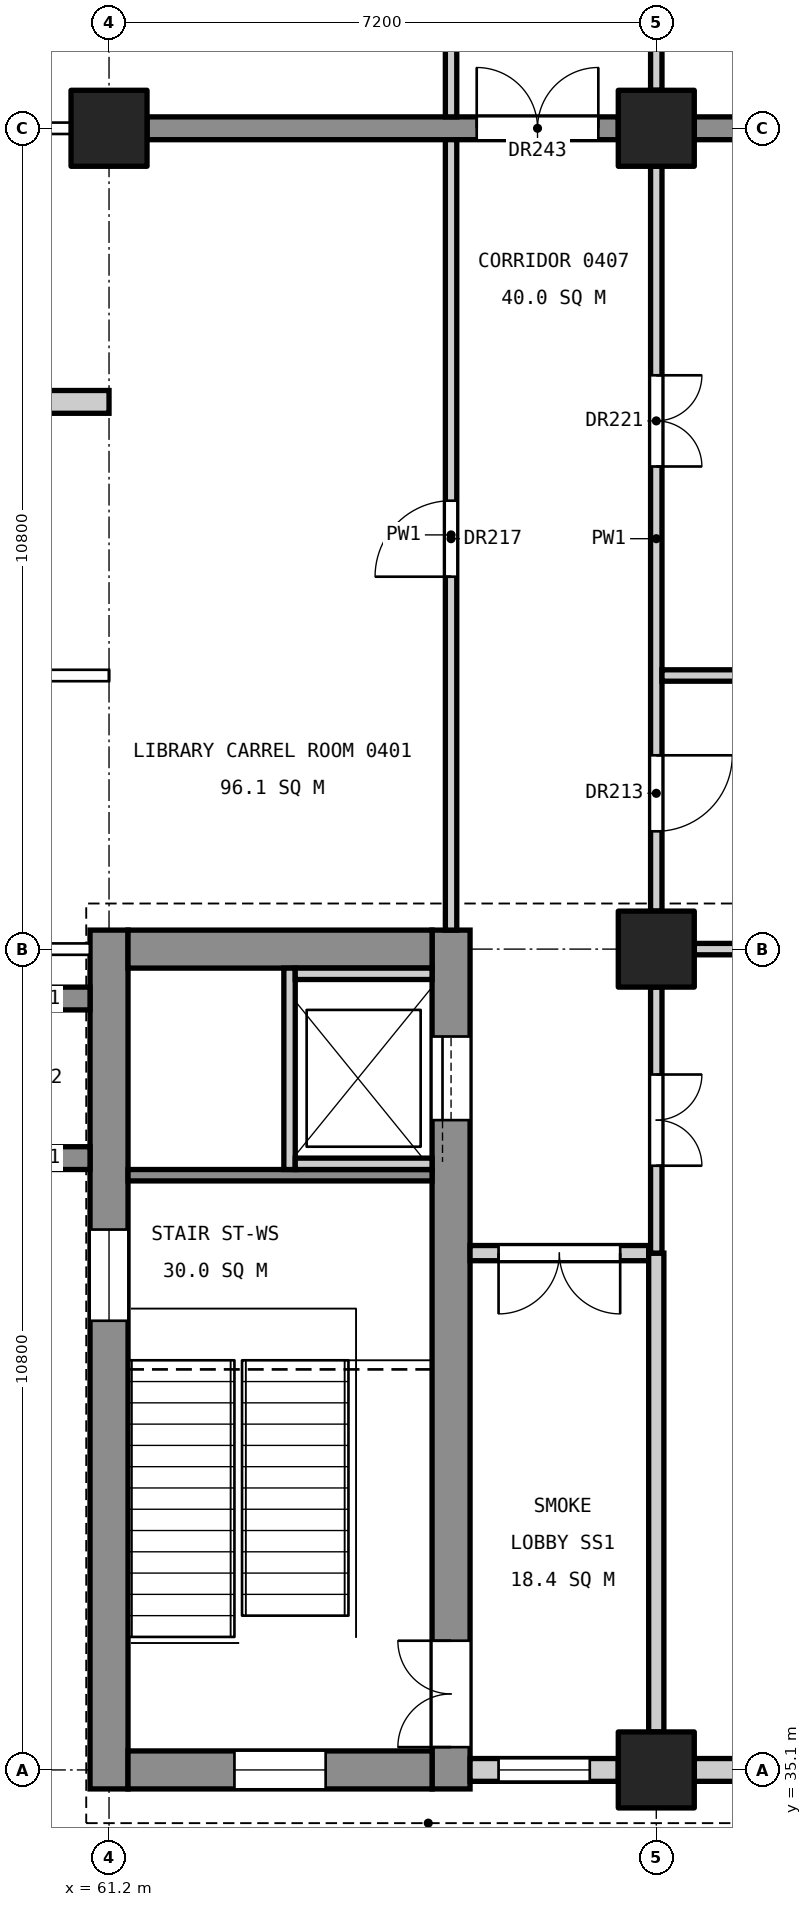
"""IFC4 building model, lengths in metres.
Left out: names, types, materials, properties, quantities, classifications, styles, units other than length and angle.
Written with IfcOpenShell. Run it as: python <this file> out.ifc"""

import sys

from ifc_helpers import new_model, si_unit, direction, frame, frame_2d, origin, origin_2d, place, context, subcontext, project, spatial, rectangle, extrude, element, fill, save


model = new_model("IFC4")
c1 = context("Model", 3, precision=1e-05, world=origin(), true_north=direction((0.0, 1.0)))
c2 = subcontext(c1, "Body", "Model", "MODEL_VIEW")
j1 = project(units=[si_unit("LENGTHUNIT", "METRE"), si_unit("PLANEANGLEUNIT", "RADIAN")], contexts=[c1])
p1 = place(None, origin())
s1 = spatial("IfcSite", under=j1, at=p1, CompositionType="ELEMENT")
p2 = place(p1, origin())
s2 = spatial("IfcBuilding", under=s1, at=p2, CompositionType="ELEMENT")
p3 = place(p2, frame((0.0, 0.0, 22.2)))
s3 = spatial("IfcBuildingStorey", under=s2, at=p3, CompositionType="ELEMENT", Elevation=22.2)
for number, where, z_axis, x_axis in (
    (1, (61.2, 56.7, 0.0), (0.0, 0.0, 1.0), (1.0, 0.0, 0.0)),
    (2, (68.4, 35.1, 0.0), (0.0, 0.0, 1.0), (1.0, 0.0, 0.0)),
    (3, (68.4, 45.9, 0.0), (0.0, 0.0, 1.0), (1.0, 0.0, 0.0)),
    (4, (68.4, 56.7, 0.0), (0.0, 0.0, 1.0), (1.0, 0.0, 0.0)),
):
    element("IfcColumn", number, at=place(p3, frame(where, z_axis=z_axis, x_axis=x_axis)), inside=s3, PredefinedType="COLUMN", context=c2, shape_type="SweptSolid", body=[
        extrude(rectangle(XDim=1.0, YDim=1.0, at=origin_2d()), origin(), (0.0, 0.0, 1.0), 4.8),
    ])
p4 = place(p3, frame((61.2, 34.85, 0.0), z_axis=(0.0, 0.0, 1.0), x_axis=(0.0, 1.0, 0.0)))
e5 = element("IfcWall", 5, at=p4, inside=s3, PredefinedType="SHEAR", context=c2, shape_type="SweptSolid", body=[
    extrude(rectangle(XDim=11.3, YDim=0.5, at=frame_2d((5.65, 0.0))), origin(), (0.0, 0.0, 1.0), 4.55),
])
p5 = place(p4, frame((6.16, 0.0, 3.4)))
e6 = element("IfcOpeningElement", 6, at=p5, cuts=e5, PredefinedType="OPENING", context=c2, shape_type="SweptSolid", body=[
    extrude(rectangle(XDim=1.2, YDim=0.9, at=frame_2d((0.6, 0.45))), frame((0.0, 0.26, 0.0), z_axis=(0.0, -1.0, 0.0), x_axis=(1.0, 0.0, 0.0)), (0.0, 0.0, 1.0), 0.52),
])
p6 = place(p3, frame((65.7, 34.85, 0.0), z_axis=(0.0, 0.0, 1.0), x_axis=(0.0, 1.0, 0.0)))
e7 = element("IfcWall", 7, at=p6, inside=s3, PredefinedType="SHEAR", context=c2, shape_type="SweptSolid", body=[
    extrude(rectangle(XDim=11.3, YDim=0.5, at=frame_2d((5.65, 0.0))), origin(), (0.0, 0.0, 1.0), 4.55),
])
p7 = place(p6, frame((0.55, 0.0, 0.0)))
e8 = element("IfcOpeningElement", 8, at=p7, cuts=e7, PredefinedType="OPENING", context=c2, shape_type="SweptSolid", body=[
    extrude(rectangle(XDim=1.4, YDim=2.1, at=frame_2d((0.7, 1.05))), frame((0.0, 0.26, 0.0), z_axis=(0.0, -1.0, 0.0), x_axis=(1.0, 0.0, 0.0)), (0.0, 0.0, 1.0), 0.52),
])
p8 = place(p6, frame((8.8, 0.0, 0.0)))
e9 = element("IfcOpeningElement", 9, at=p8, cuts=e7, PredefinedType="OPENING", context=c2, shape_type="SweptSolid", body=[
    extrude(rectangle(XDim=1.1, YDim=2.1, at=frame_2d((0.55, 1.05))), frame((0.0, 0.26, 0.0), z_axis=(0.0, -1.0, 0.0), x_axis=(1.0, 0.0, 0.0)), (0.0, 0.0, 1.0), 0.52),
])
p9 = place(p3, frame((61.45, 35.1, 0.0), z_axis=(0.0, 0.0, 1.0), x_axis=(1.0, 0.0, 0.0)))
e10 = element("IfcWall", 10, at=p9, inside=s3, PredefinedType="SHEAR", context=c2, shape_type="SweptSolid", body=[
    extrude(rectangle(XDim=4.0, YDim=0.5, at=frame_2d((2.0, 0.0))), origin(), (0.0, 0.0, 1.0), 4.55),
])
p10 = place(p9, frame((1.4, 0.0, 3.4)))
e11 = element("IfcOpeningElement", 11, at=p10, cuts=e10, PredefinedType="OPENING", context=c2, shape_type="SweptSolid", body=[
    extrude(rectangle(XDim=1.2, YDim=0.9, at=frame_2d((0.6, 0.45))), frame((0.0, 0.26, 0.0), z_axis=(0.0, -1.0, 0.0), x_axis=(1.0, 0.0, 0.0)), (0.0, 0.0, 1.0), 0.52),
])
p11 = place(p3, frame((61.45, 45.9, 0.0), z_axis=(0.0, 0.0, 1.0), x_axis=(1.0, 0.0, 0.0)))
e12 = element("IfcWall", 12, at=p11, inside=s3, PredefinedType="SHEAR", context=c2, shape_type="SweptSolid", body=[
    extrude(rectangle(XDim=4.0, YDim=0.5, at=frame_2d((2.0, 0.0))), origin(), (0.0, 0.0, 1.0), 4.55),
])
for number, where, z_axis, x_axis in (
    (13, (60.95, 43.15, 0.0), (0.0, 0.0, 1.0), (-1.0, 0.0, 0.0)),
    (14, (60.95, 45.25, 0.0), (0.0, 0.0, 1.0), (-1.0, 0.0, 0.0)),
):
    element("IfcWall", number, at=place(p3, frame(where, z_axis=z_axis, x_axis=x_axis)), inside=s3, PredefinedType="SHEAR", context=c2, shape_type="SweptSolid", body=[
        extrude(rectangle(XDim=1.25, YDim=0.3, at=frame_2d((0.625, 0.0))), origin(), (0.0, 0.0, 1.0), 4.8),
    ])
p12 = place(p3, frame((61.7, 56.7, 0.0), z_axis=(0.0, 0.0, 1.0), x_axis=(1.0, 0.0, 0.0)))
e15 = element("IfcWall", 15, at=p12, inside=s3, PredefinedType="SHEAR", context=c2, shape_type="SweptSolid", body=[
    extrude(rectangle(XDim=6.2, YDim=0.3, at=frame_2d((3.1, 0.0))), origin(), (0.0, 0.0, 1.0), 4.55),
])
p13 = place(p12, frame((4.337, 0.0, 0.0)))
e16 = element("IfcOpeningElement", 16, at=p13, cuts=e15, PredefinedType="OPENING", context=c2, shape_type="SweptSolid", body=[
    extrude(rectangle(XDim=1.6, YDim=2.1, at=frame_2d((0.8, 1.05))), frame((0.0, 0.16, 0.0), z_axis=(0.0, -1.0, 0.0), x_axis=(1.0, 0.0, 0.0)), (0.0, 0.0, 1.0), 0.32),
])
p14 = place(p3, frame((68.9, 56.7, 0.0), z_axis=(0.0, 0.0, 1.0), x_axis=(1.0, 0.0, 0.0)))
e17 = element("IfcWall", 17, at=p14, inside=s3, PredefinedType="SHEAR", context=c2, shape_type="SweptSolid", body=[
    extrude(rectangle(XDim=9.8, YDim=0.3, at=frame_2d((4.9, 0.0))), origin(), (0.0, 0.0, 1.0), 4.55),
])
p15 = place(p3, frame((61.45, 42.925, 0.0), z_axis=(0.0, 0.0, 1.0), x_axis=(1.0, 0.0, 0.0)))
e18 = element("IfcWall", 18, at=p15, inside=s3, PredefinedType="SOLIDWALL", context=c2, shape_type="SweptSolid", body=[
    extrude(rectangle(XDim=4.0, YDim=0.15, at=frame_2d((2.0, 0.0))), origin(), (0.0, 0.0, 1.0), 4.55),
])
p16 = place(p3, frame((63.575, 43.0, 0.0), z_axis=(0.0, 0.0, 1.0), x_axis=(0.0, 1.0, 0.0)))
e19 = element("IfcWall", 19, at=p16, inside=s3, PredefinedType="SOLIDWALL", context=c2, shape_type="SweptSolid", body=[
    extrude(rectangle(XDim=2.65, YDim=0.15, at=frame_2d((1.325, 0.0))), origin(), (0.0, 0.0, 1.0), 4.8),
])
for number, where, z_axis, x_axis in (
    (20, (63.65, 43.075, 0.0), (0.0, 0.0, 1.0), (1.0, 0.0, 0.0)),
    (21, (63.65, 45.575, 0.0), (0.0, 0.0, 1.0), (1.0, 0.0, 0.0)),
):
    element("IfcWall", number, at=place(p3, frame(where, z_axis=z_axis, x_axis=x_axis)), inside=s3, PredefinedType="SOLIDWALL", context=c2, shape_type="SweptSolid", body=[
        extrude(rectangle(XDim=1.8, YDim=0.15, at=frame_2d((0.9, 0.0))), origin(), (0.0, 0.0, 1.0), 4.8),
    ])
p17 = place(p3, frame((65.95, 35.1, 0.0), z_axis=(0.0, 0.0, 1.0), x_axis=(1.0, 0.0, 0.0)))
e22 = element("IfcWall", 22, at=p17, inside=s3, PredefinedType="STANDARD", context=c2, shape_type="SweptSolid", body=[
    extrude(rectangle(XDim=1.95, YDim=0.3, at=frame_2d((0.975, 0.0))), origin(), (0.0, 0.0, 1.0), 3.85),
])
p18 = place(p17, frame((0.375, 0.0, 0.9)))
e23 = element("IfcOpeningElement", 23, at=p18, cuts=e22, PredefinedType="OPENING", context=c2, shape_type="SweptSolid", body=[
    extrude(rectangle(XDim=1.2, YDim=2.4, at=frame_2d((0.6, 1.2))), frame((0.0, 0.16, 0.0), z_axis=(0.0, -1.0, 0.0), x_axis=(1.0, 0.0, 0.0)), (0.0, 0.0, 1.0), 0.32),
])
p19 = place(p3, frame((68.9, 35.1, 0.0), z_axis=(0.0, 0.0, 1.0), x_axis=(1.0, 0.0, 0.0)))
e24 = element("IfcWall", 24, at=p19, inside=s3, PredefinedType="STANDARD", context=c2, shape_type="SweptSolid", body=[
    extrude(rectangle(XDim=9.8, YDim=0.3, at=frame_2d((4.9, 0.0))), origin(), (0.0, 0.0, 1.0), 3.85),
])
p20 = place(p19, frame((0.65, 0.0, 0.9)))
e25 = element("IfcOpeningElement", 25, at=p20, cuts=e24, PredefinedType="OPENING", context=c2, shape_type="SweptSolid", body=[
    extrude(rectangle(XDim=1.8, YDim=2.4, at=frame_2d((0.9, 1.2))), frame((0.0, 0.16, 0.0), z_axis=(0.0, -1.0, 0.0), x_axis=(1.0, 0.0, 0.0)), (0.0, 0.0, 1.0), 0.32),
])
p21 = place(p19, frame((4.525, 0.0, 0.8)))
e26 = element("IfcOpeningElement", 26, at=p21, cuts=e24, PredefinedType="OPENING", context=c2, shape_type="SweptSolid", body=[
    extrude(rectangle(XDim=0.75, YDim=1.2, at=frame_2d((0.375, 0.6))), frame((0.0, 0.16, 0.0), z_axis=(0.0, -1.0, 0.0), x_axis=(1.0, 0.0, 0.0)), (0.0, 0.0, 1.0), 0.32),
])
p22 = place(p19, frame((7.35, 0.0, 0.9)))
e27 = element("IfcOpeningElement", 27, at=p22, cuts=e24, PredefinedType="OPENING", context=c2, shape_type="SweptSolid", body=[
    extrude(rectangle(XDim=1.8, YDim=2.4, at=frame_2d((0.9, 1.2))), frame((0.0, 0.16, 0.0), z_axis=(0.0, -1.0, 0.0), x_axis=(1.0, 0.0, 0.0)), (0.0, 0.0, 1.0), 0.32),
])
p23 = place(p3, frame((56.4, 53.1, 0.0), z_axis=(0.0, 0.0, 1.0), x_axis=(1.0, 0.0, 0.0)))
e28 = element("IfcWall", 28, at=p23, inside=s3, PredefinedType="STANDARD", context=c2, shape_type="SweptSolid", body=[
    extrude(rectangle(XDim=4.8, YDim=0.3, at=frame_2d((2.4, 0.0))), origin(), (0.0, 0.0, 1.0), 3.65),
])
p24 = place(p3, frame((65.7, 46.15, 0.0), z_axis=(0.0, 0.0, 1.0), x_axis=(0.0, 1.0, 0.0)))
e29 = element("IfcWall", 29, at=p24, inside=s3, PredefinedType="PARTITIONING", context=c2, shape_type="SweptSolid", body=[
    extrude(rectangle(XDim=10.4, YDim=0.15, at=frame_2d((5.2, 0.0))), origin(), (0.0, 0.0, 1.0), 3.55),
])
p25 = place(p24, frame((4.65, 0.0, 0.0)))
e30 = element("IfcOpeningElement", 30, at=p25, cuts=e29, PredefinedType="OPENING", context=c2, shape_type="SweptSolid", body=[
    extrude(rectangle(XDim=1.0, YDim=2.1, at=frame_2d((0.5, 1.05))), frame((0.0, 0.085, 0.0), z_axis=(0.0, -1.0, 0.0), x_axis=(1.0, 0.0, 0.0)), (0.0, 0.0, 1.0), 0.17),
])
p26 = place(p3, frame((65.7, 56.85, 0.0), z_axis=(0.0, 0.0, 1.0), x_axis=(0.0, 1.0, 0.0)))
e31 = element("IfcWall", 31, at=p26, inside=s3, PredefinedType="PARTITIONING", context=c2, shape_type="SweptSolid", body=[
    extrude(rectangle(XDim=3.2, YDim=0.15, at=frame_2d((1.6, 0.0))), origin(), (0.0, 0.0, 1.0), 3.55),
])
p27 = place(p26, frame((1.15, 0.0, 0.0)))
e32 = element("IfcOpeningElement", 32, at=p27, cuts=e31, PredefinedType="OPENING", context=c2, shape_type="SweptSolid", body=[
    extrude(rectangle(XDim=1.0, YDim=2.1, at=frame_2d((0.5, 1.05))), frame((0.0, 0.085, 0.0), z_axis=(0.0, -1.0, 0.0), x_axis=(1.0, 0.0, 0.0)), (0.0, 0.0, 1.0), 0.17),
])
p28 = place(p3, frame((65.95, 41.9, 0.0), z_axis=(0.0, 0.0, 1.0), x_axis=(1.0, 0.0, 0.0)))
e33 = element("IfcWall", 33, at=p28, inside=s3, PredefinedType="PARTITIONING", context=c2, shape_type="SweptSolid", body=[
    extrude(rectangle(XDim=2.35, YDim=0.2, at=frame_2d((1.175, 0.0))), origin(), (0.0, 0.0, 1.0), 3.55),
])
p29 = place(p28, frame((0.375, 0.0, 0.0)))
e34 = element("IfcOpeningElement", 34, at=p29, cuts=e33, PredefinedType="OPENING", context=c2, shape_type="SweptSolid", body=[
    extrude(rectangle(XDim=1.6, YDim=2.1, at=frame_2d((0.8, 1.05))), frame((0.0, 0.11, 0.0), z_axis=(0.0, -1.0, 0.0), x_axis=(1.0, 0.0, 0.0)), (0.0, 0.0, 1.0), 0.22),
])
p30 = place(p3, frame((68.4, 35.6, 0.0), z_axis=(0.0, 0.0, 1.0), x_axis=(0.0, 1.0, 0.0)))
e35 = element("IfcWall", 35, at=p30, inside=s3, PredefinedType="PARTITIONING", context=c2, shape_type="SweptSolid", body=[
    extrude(rectangle(XDim=6.3, YDim=0.2, at=frame_2d((3.15, 0.0))), origin(), (0.0, 0.0, 1.0), 3.55),
])
p31 = place(p3, frame((68.4, 41.9, 0.0), z_axis=(0.0, 0.0, 1.0), x_axis=(0.0, 1.0, 0.0)))
e36 = element("IfcWall", 36, at=p31, inside=s3, PredefinedType="PARTITIONING", context=c2, shape_type="SweptSolid", body=[
    extrude(rectangle(XDim=3.5, YDim=0.15, at=frame_2d((1.75, 0.0))), origin(), (0.0, 0.0, 1.0), 3.55),
])
p32 = place(p31, frame((1.15, 0.0, 0.0)))
e37 = element("IfcOpeningElement", 37, at=p32, cuts=e36, PredefinedType="OPENING", context=c2, shape_type="SweptSolid", body=[
    extrude(rectangle(XDim=1.2, YDim=2.1, at=frame_2d((0.6, 1.05))), frame((0.0, 0.085, 0.0), z_axis=(0.0, -1.0, 0.0), x_axis=(1.0, 0.0, 0.0)), (0.0, 0.0, 1.0), 0.17),
])
p33 = place(p3, frame((68.4, 46.4, 0.0), z_axis=(0.0, 0.0, 1.0), x_axis=(0.0, 1.0, 0.0)))
e38 = element("IfcWall", 38, at=p33, inside=s3, PredefinedType="PARTITIONING", context=c2, shape_type="SweptSolid", body=[
    extrude(rectangle(XDim=9.8, YDim=0.15, at=frame_2d((4.9, 0.0))), origin(), (0.0, 0.0, 1.0), 3.55),
])
p34 = place(p33, frame((1.05, 0.0, 0.0)))
e39 = element("IfcOpeningElement", 39, at=p34, cuts=e38, PredefinedType="OPENING", context=c2, shape_type="SweptSolid", body=[
    extrude(rectangle(XDim=1.0, YDim=2.1, at=frame_2d((0.5, 1.05))), frame((0.0, 0.085, 0.0), z_axis=(0.0, -1.0, 0.0), x_axis=(1.0, 0.0, 0.0)), (0.0, 0.0, 1.0), 0.17),
])
p35 = place(p33, frame((5.85, 0.0, 0.0)))
e40 = element("IfcOpeningElement", 40, at=p35, cuts=e38, PredefinedType="OPENING", context=c2, shape_type="SweptSolid", body=[
    extrude(rectangle(XDim=1.2, YDim=2.1, at=frame_2d((0.6, 1.05))), frame((0.0, 0.085, 0.0), z_axis=(0.0, -1.0, 0.0), x_axis=(1.0, 0.0, 0.0)), (0.0, 0.0, 1.0), 0.17),
])
p36 = place(p3, frame((68.4, 57.2, 0.0), z_axis=(0.0, 0.0, 1.0), x_axis=(0.0, 1.0, 0.0)))
e41 = element("IfcWall", 41, at=p36, inside=s3, PredefinedType="PARTITIONING", context=c2, shape_type="SweptSolid", body=[
    extrude(rectangle(XDim=3.1, YDim=0.15, at=frame_2d((1.55, 0.0))), origin(), (0.0, 0.0, 1.0), 3.55),
])
p37 = place(p3, frame((68.9, 45.9, 0.0), z_axis=(0.0, 0.0, 1.0), x_axis=(1.0, 0.0, 0.0)))
e42 = element("IfcWall", 42, at=p37, inside=s3, PredefinedType="PARTITIONING", context=c2, shape_type="SweptSolid", body=[
    extrude(rectangle(XDim=9.8, YDim=0.15, at=frame_2d((4.9, 0.0))), origin(), (0.0, 0.0, 1.0), 3.85),
])
p38 = place(p3, frame((68.475, 49.5, 0.0), z_axis=(0.0, 0.0, 1.0), x_axis=(1.0, 0.0, 0.0)))
e43 = element("IfcWall", 43, at=p38, inside=s3, PredefinedType="PARTITIONING", context=c2, shape_type="SweptSolid", body=[
    extrude(rectangle(XDim=10.575, YDim=0.15, at=frame_2d((5.288, 0.0))), origin(), (0.0, 0.0, 1.0), 3.85),
])
p39 = place(p7, origin())
e44 = element("IfcDoor", 44, at=p39, inside=s3, OperationType="DOUBLE_DOOR_SINGLE_SWING", PredefinedType="DOOR", context=c2, shape_type="SweptSolid", body=[
    extrude(rectangle(XDim=1.4, YDim=2.1, at=frame_2d((0.7, 1.05))), frame((0.0, 0.025, 0.0), z_axis=(0.0, -1.0, 0.0), x_axis=(1.0, 0.0, 0.0)), (0.0, 0.0, 1.0), 0.05),
])
fill(e8, e44)
p40 = place(p8, origin())
e45 = element("IfcDoor", 45, at=p40, inside=s3, OperationType="SLIDING_TO_LEFT", PredefinedType="DOOR", context=c2, shape_type="SweptSolid", body=[
    extrude(rectangle(XDim=1.1, YDim=2.1, at=frame_2d((0.55, 1.05))), frame((0.0, 0.025, 0.0), z_axis=(0.0, -1.0, 0.0), x_axis=(1.0, 0.0, 0.0)), (0.0, 0.0, 1.0), 0.05),
])
fill(e9, e45)
p41 = place(p18, origin())
e46 = element("IfcWindow", 46, at=p41, inside=s3, PartitioningType="SINGLE_PANEL", PredefinedType="WINDOW", context=c2, shape_type="SweptSolid", body=[
    extrude(rectangle(XDim=1.2, YDim=2.4, at=frame_2d((0.6, 1.2))), frame((0.0, 0.03, 0.0), z_axis=(0.0, -1.0, 0.0), x_axis=(1.0, 0.0, 0.0)), (0.0, 0.0, 1.0), 0.06),
])
fill(e23, e46)
p42 = place(p5, origin())
e47 = element("IfcWindow", 47, at=p42, inside=s3, PartitioningType="SINGLE_PANEL", PredefinedType="WINDOW", context=c2, shape_type="SweptSolid", body=[
    extrude(rectangle(XDim=1.2, YDim=0.9, at=frame_2d((0.6, 0.45))), frame((0.0, 0.03, 0.0), z_axis=(0.0, -1.0, 0.0), x_axis=(1.0, 0.0, 0.0)), (0.0, 0.0, 1.0), 0.06),
])
fill(e6, e47)
p43 = place(p10, origin())
e48 = element("IfcWindow", 48, at=p43, inside=s3, PartitioningType="SINGLE_PANEL", PredefinedType="WINDOW", context=c2, shape_type="SweptSolid", body=[
    extrude(rectangle(XDim=1.2, YDim=0.9, at=frame_2d((0.6, 0.45))), frame((0.0, 0.03, 0.0), z_axis=(0.0, -1.0, 0.0), x_axis=(1.0, 0.0, 0.0)), (0.0, 0.0, 1.0), 0.06),
])
fill(e11, e48)
p44 = place(p34, frame((1.0, 0.0, 0.0), z_axis=(0.0, 0.0, 1.0), x_axis=(-1.0, 0.0, 0.0)))
e49 = element("IfcDoor", 49, at=p44, inside=s3, OperationType="SINGLE_SWING_LEFT", PredefinedType="DOOR", context=c2, shape_type="SweptSolid", body=[
    extrude(rectangle(XDim=1.0, YDim=2.1, at=frame_2d((0.5, 1.05))), frame((0.0, 0.025, 0.0), z_axis=(0.0, -1.0, 0.0), x_axis=(1.0, 0.0, 0.0)), (0.0, 0.0, 1.0), 0.05),
])
fill(e39, e49)
p45 = place(p25, origin())
e50 = element("IfcDoor", 50, at=p45, inside=s3, OperationType="SINGLE_SWING_LEFT", PredefinedType="DOOR", context=c2, shape_type="SweptSolid", body=[
    extrude(rectangle(XDim=1.0, YDim=2.1, at=frame_2d((0.5, 1.05))), frame((0.0, 0.025, 0.0), z_axis=(0.0, -1.0, 0.0), x_axis=(1.0, 0.0, 0.0)), (0.0, 0.0, 1.0), 0.05),
])
fill(e30, e50)
p46 = place(p32, frame((1.2, 0.0, 0.0), z_axis=(0.0, 0.0, 1.0), x_axis=(-1.0, 0.0, 0.0)))
e51 = element("IfcDoor", 51, at=p46, inside=s3, OperationType="DOUBLE_DOOR_SINGLE_SWING", PredefinedType="DOOR", context=c2, shape_type="SweptSolid", body=[
    extrude(rectangle(XDim=1.2, YDim=2.1, at=frame_2d((0.6, 1.05))), frame((0.0, 0.025, 0.0), z_axis=(0.0, -1.0, 0.0), x_axis=(1.0, 0.0, 0.0)), (0.0, 0.0, 1.0), 0.05),
])
fill(e37, e51)
p47 = place(p35, frame((1.2, 0.0, 0.0), z_axis=(0.0, 0.0, 1.0), x_axis=(-1.0, 0.0, 0.0)))
e52 = element("IfcDoor", 52, at=p47, inside=s3, OperationType="DOUBLE_DOOR_SINGLE_SWING", PredefinedType="DOOR", context=c2, shape_type="SweptSolid", body=[
    extrude(rectangle(XDim=1.2, YDim=2.1, at=frame_2d((0.6, 1.05))), frame((0.0, 0.025, 0.0), z_axis=(0.0, -1.0, 0.0), x_axis=(1.0, 0.0, 0.0)), (0.0, 0.0, 1.0), 0.05),
])
fill(e40, e52)
p48 = place(p29, frame((1.6, 0.0, 0.0), z_axis=(0.0, 0.0, 1.0), x_axis=(-1.0, 0.0, 0.0)))
e53 = element("IfcDoor", 53, at=p48, inside=s3, OperationType="DOUBLE_DOOR_SINGLE_SWING", PredefinedType="DOOR", context=c2, shape_type="SweptSolid", body=[
    extrude(rectangle(XDim=1.6, YDim=2.1, at=frame_2d((0.8, 1.05))), frame((0.0, 0.025, 0.0), z_axis=(0.0, -1.0, 0.0), x_axis=(1.0, 0.0, 0.0)), (0.0, 0.0, 1.0), 0.05),
])
fill(e34, e53)
p49 = place(p13, origin())
e54 = element("IfcDoor", 54, at=p49, inside=s3, OperationType="DOUBLE_DOOR_SINGLE_SWING", PredefinedType="DOOR", context=c2, shape_type="SweptSolid", body=[
    extrude(rectangle(XDim=1.6, YDim=2.1, at=frame_2d((0.8, 1.05))), frame((0.0, 0.025, 0.0), z_axis=(0.0, -1.0, 0.0), x_axis=(1.0, 0.0, 0.0)), (0.0, 0.0, 1.0), 0.05),
])
fill(e16, e54)
save(model, sys.argv[1])
